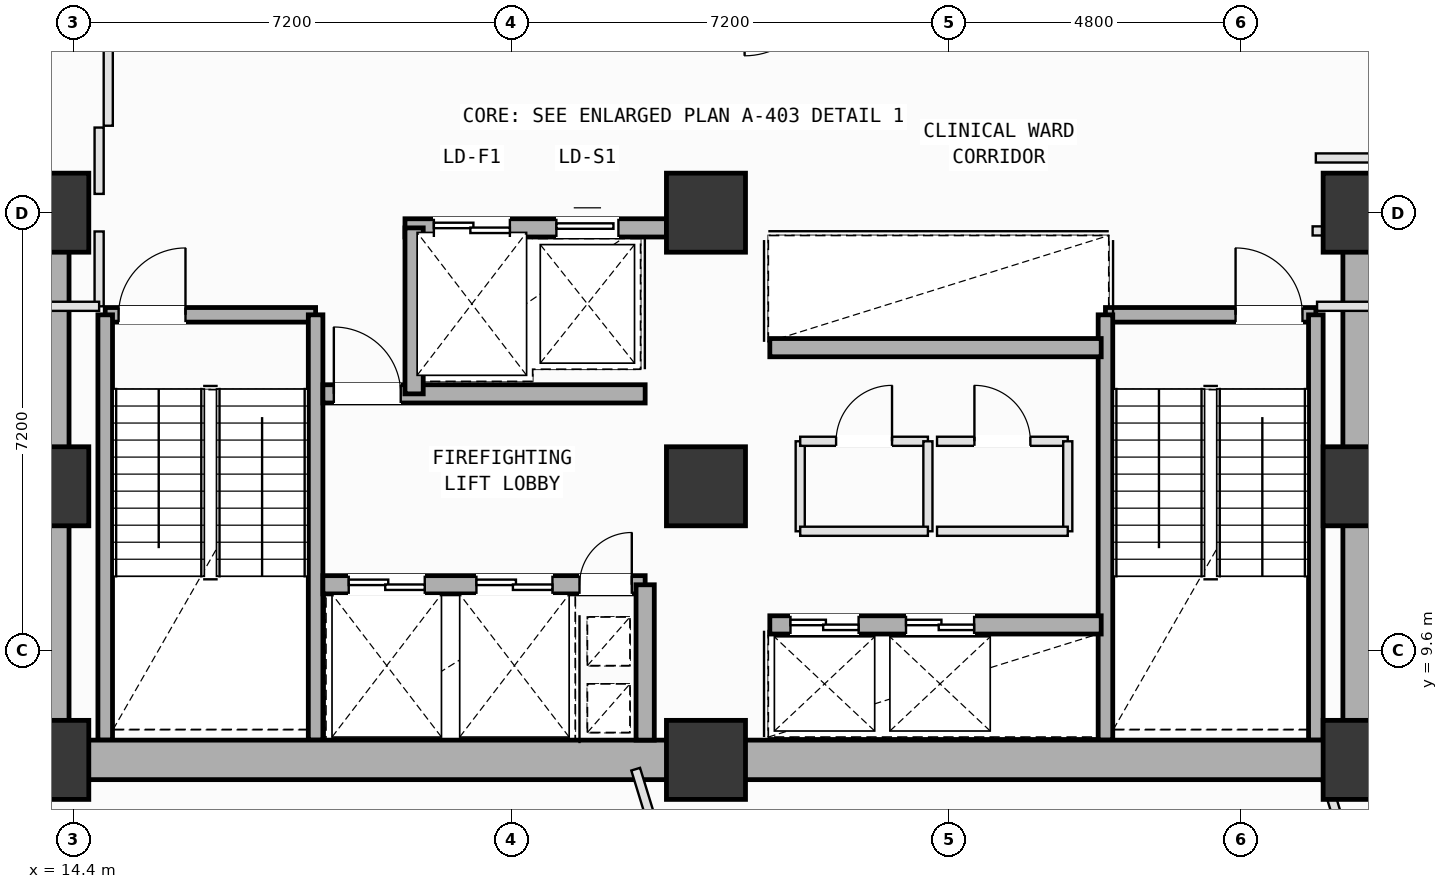
"""IFC4 building model, lengths in metres.
Left out: names, types, materials, properties, quantities, classifications, styles, units other than length and angle.
Written with IfcOpenShell. Run it as: python <this file> out.ifc"""

import sys

from ifc_helpers import new_model, si_unit, direction, frame, frame_2d, origin, origin_2d, place, context, subcontext, project, spatial, rectangle, extrude, element, fill, save


model = new_model("IFC4")
c1 = context("Model", 3, precision=1e-05, world=origin(), true_north=direction((0.0, 1.0)))
c2 = subcontext(c1, "Body", "Model", "MODEL_VIEW")
j1 = project(units=[si_unit("LENGTHUNIT", "METRE"), si_unit("PLANEANGLEUNIT", "RADIAN")], contexts=[c1])
p1 = place(None, origin())
s1 = spatial("IfcSite", under=j1, at=p1, CompositionType="ELEMENT")
p2 = place(p1, origin())
s2 = spatial("IfcBuilding", under=s1, at=p2, CompositionType="ELEMENT")
p3 = place(p2, frame((0.0, 0.0, 96.4)))
s3 = spatial("IfcBuildingStorey", under=s2, at=p3, CompositionType="ELEMENT", Elevation=96.4)
for number, where, z_axis, x_axis in (
    (1, (14.0, 7.8, 0.0), (0.0, 0.0, 1.0), (1.0, 0.0, 0.0)),
    (2, (14.0, 12.3, 0.0), (0.0, 0.0, 1.0), (1.0, 0.0, 0.0)),
    (3, (14.0, 16.8, 0.0), (0.0, 0.0, 1.0), (1.0, 0.0, 0.0)),
    (4, (24.8, 7.8, 0.0), (0.0, 0.0, 1.0), (1.0, 0.0, 0.0)),
    (5, (24.8, 12.3, 0.0), (0.0, 0.0, 1.0), (1.0, 0.0, 0.0)),
    (6, (24.8, 16.8, 0.0), (0.0, 0.0, 1.0), (1.0, 0.0, 0.0)),
    (7, (35.6, 7.8, 0.0), (0.0, 0.0, 1.0), (1.0, 0.0, 0.0)),
    (8, (35.6, 12.3, 0.0), (0.0, 0.0, 1.0), (1.0, 0.0, 0.0)),
    (9, (35.6, 16.8, 0.0), (0.0, 0.0, 1.0), (1.0, 0.0, 0.0)),
):
    element("IfcColumn", number, at=place(p3, frame(where, z_axis=z_axis, x_axis=x_axis)), inside=s3, PredefinedType="COLUMN", context=c2, shape_type="SweptSolid", body=[
        extrude(rectangle(XDim=1.3, YDim=1.3, at=origin_2d()), origin(), (0.0, 0.0, 1.0), 4.0),
    ])
p4 = place(p3, frame((14.92, 15.12, 0.0), z_axis=(0.0, 0.0, 1.0), x_axis=(1.0, 0.0, 0.0)))
e10 = element("IfcWall", 10, at=p4, inside=s3, PredefinedType="SOLIDWALL", context=c2, shape_type="SweptSolid", body=[
    extrude(rectangle(XDim=3.46, YDim=0.24, at=frame_2d((1.73, 0.0))), origin(), (0.0, 0.0, 1.0), 3.78),
])
p5 = place(p4, frame((0.22, 0.0, 0.0)))
e11 = element("IfcOpeningElement", 11, at=p5, cuts=e10, PredefinedType="OPENING", context=c2, shape_type="SweptSolid", body=[
    extrude(rectangle(XDim=1.1, YDim=2.15, at=frame_2d((0.55, 1.075))), frame((0.0, 0.13, 0.0), z_axis=(0.0, -1.0, 0.0), x_axis=(1.0, 0.0, 0.0)), (0.0, 0.0, 1.0), 0.26),
])
for number, where, z_axis, x_axis in (
    (12, (18.38, 15.12, 0.0), (0.0, 0.0, 1.0), (0.0, -1.0, 0.0)),
    (13, (14.92, 8.125, 0.0), (0.0, 0.0, 1.0), (0.0, 1.0, 0.0)),
):
    element("IfcWall", number, at=place(p3, frame(where, z_axis=z_axis, x_axis=x_axis)), inside=s3, PredefinedType="SOLIDWALL", context=c2, shape_type="SweptSolid", body=[
        extrude(rectangle(XDim=6.995, YDim=0.24, at=frame_2d((3.498, 0.0))), origin(), (0.0, 0.0, 1.0), 3.78),
    ])
p6 = place(p3, frame((31.37, 15.12, 0.0), z_axis=(0.0, 0.0, 1.0), x_axis=(1.0, 0.0, 0.0)))
e14 = element("IfcWall", 14, at=p6, inside=s3, PredefinedType="SOLIDWALL", context=c2, shape_type="SweptSolid", body=[
    extrude(rectangle(XDim=3.46, YDim=0.24, at=frame_2d((1.73, 0.0))), origin(), (0.0, 0.0, 1.0), 3.78),
])
p7 = place(p6, frame((2.14, 0.0, 0.0)))
e15 = element("IfcOpeningElement", 15, at=p7, cuts=e14, PredefinedType="OPENING", context=c2, shape_type="SweptSolid", body=[
    extrude(rectangle(XDim=1.1, YDim=2.15, at=frame_2d((0.55, 1.075))), frame((0.0, 0.13, 0.0), z_axis=(0.0, -1.0, 0.0), x_axis=(1.0, 0.0, 0.0)), (0.0, 0.0, 1.0), 0.26),
])
for number, where, z_axis, x_axis in (
    (16, (34.83, 15.12, 0.0), (0.0, 0.0, 1.0), (0.0, -1.0, 0.0)),
    (17, (31.37, 8.125, 0.0), (0.0, 0.0, 1.0), (0.0, 1.0, 0.0)),
):
    element("IfcWall", number, at=place(p3, frame(where, z_axis=z_axis, x_axis=x_axis)), inside=s3, PredefinedType="SOLIDWALL", context=c2, shape_type="SweptSolid", body=[
        extrude(rectangle(XDim=6.995, YDim=0.24, at=frame_2d((3.498, 0.0))), origin(), (0.0, 0.0, 1.0), 3.78),
    ])
for number, where, z_axis, x_axis in (
    (18, (14.0, 7.8, 0.0), (0.0, 0.0, 1.0), (1.0, 0.0, 0.0)),
    (19, (24.8, 7.8, 0.0), (0.0, 0.0, 1.0), (1.0, 0.0, 0.0)),
):
    element("IfcWall", number, at=place(p3, frame(where, z_axis=z_axis, x_axis=x_axis)), inside=s3, PredefinedType="SHEAR", context=c2, shape_type="SweptSolid", body=[
        extrude(rectangle(XDim=10.8, YDim=0.65, at=frame_2d((5.4, 0.0))), origin(), (0.0, 0.0, 1.0), 3.78),
    ])
for number, where, z_axis, x_axis in (
    (20, (35.6, 7.8, 0.0), (0.0, 0.0, 1.0), (0.0, 1.0, 0.0)),
    (21, (14.0, 16.8, 0.0), (0.0, 0.0, 1.0), (0.0, -1.0, 0.0)),
):
    element("IfcWall", number, at=place(p3, frame(where, z_axis=z_axis, x_axis=x_axis)), inside=s3, PredefinedType="SHEAR", context=c2, shape_type="SweptSolid", body=[
        extrude(rectangle(XDim=9.0, YDim=0.65, at=frame_2d((4.5, 0.0))), origin(), (0.0, 0.0, 1.0), 3.78),
    ])
p8 = place(p3, frame((19.85, 16.55, 0.0), z_axis=(0.0, 0.0, 1.0), x_axis=(1.0, 0.0, 0.0)))
e22 = element("IfcWall", 22, at=p8, inside=s3, PredefinedType="SOLIDWALL", context=c2, shape_type="SweptSolid", body=[
    extrude(rectangle(XDim=4.3, YDim=0.3, at=frame_2d((2.15, 0.0))), origin(), (0.0, 0.0, 1.0), 3.78),
])
p9 = place(p8, frame((0.475, 0.0, 0.0)))
e23 = element("IfcOpeningElement", 23, at=p9, cuts=e22, PredefinedType="OPENING", context=c2, shape_type="SweptSolid", body=[
    extrude(rectangle(XDim=1.25, YDim=2.18, at=frame_2d((0.625, 1.09))), frame((0.0, 0.16, 0.0), z_axis=(0.0, -1.0, 0.0), x_axis=(1.0, 0.0, 0.0)), (0.0, 0.0, 1.0), 0.32),
])
p10 = place(p8, frame((2.49, 0.0, 0.0)))
e24 = element("IfcOpeningElement", 24, at=p10, cuts=e22, PredefinedType="OPENING", context=c2, shape_type="SweptSolid", body=[
    extrude(rectangle(XDim=1.02, YDim=2.12, at=frame_2d((0.51, 1.06))), frame((0.0, 0.16, 0.0), z_axis=(0.0, -1.0, 0.0), x_axis=(1.0, 0.0, 0.0)), (0.0, 0.0, 1.0), 0.32),
])
p11 = place(p3, frame((18.5, 10.68, 0.0), z_axis=(0.0, 0.0, 1.0), x_axis=(1.0, 0.0, 0.0)))
e25 = element("IfcWall", 25, at=p11, inside=s3, PredefinedType="SOLIDWALL", context=c2, shape_type="SweptSolid", body=[
    extrude(rectangle(XDim=5.3, YDim=0.3, at=frame_2d((2.65, 0.0))), origin(), (0.0, 0.0, 1.0), 3.78),
])
p12 = place(p11, frame((4.22, 0.0, 0.0)))
e26 = element("IfcOpeningElement", 26, at=p12, cuts=e25, PredefinedType="OPENING", context=c2, shape_type="SweptSolid", body=[
    extrude(rectangle(XDim=0.86, YDim=2.06, at=frame_2d((0.43, 1.03))), frame((0.0, 0.16, 0.0), z_axis=(0.0, -1.0, 0.0), x_axis=(1.0, 0.0, 0.0)), (0.0, 0.0, 1.0), 0.32),
])
p13 = place(p11, frame((0.425, 0.0, 0.0)))
e27 = element("IfcOpeningElement", 27, at=p13, cuts=e25, PredefinedType="OPENING", context=c2, shape_type="SweptSolid", body=[
    extrude(rectangle(XDim=1.25, YDim=2.18, at=frame_2d((0.625, 1.09))), frame((0.0, 0.16, 0.0), z_axis=(0.0, -1.0, 0.0), x_axis=(1.0, 0.0, 0.0)), (0.0, 0.0, 1.0), 0.32),
])
p14 = place(p11, frame((2.525, 0.0, 0.0)))
e28 = element("IfcOpeningElement", 28, at=p14, cuts=e25, PredefinedType="OPENING", context=c2, shape_type="SweptSolid", body=[
    extrude(rectangle(XDim=1.25, YDim=2.18, at=frame_2d((0.625, 1.09))), frame((0.0, 0.16, 0.0), z_axis=(0.0, -1.0, 0.0), x_axis=(1.0, 0.0, 0.0)), (0.0, 0.0, 1.0), 0.32),
])
p15 = place(p3, frame((18.5, 13.82, 0.0), z_axis=(0.0, 0.0, 1.0), x_axis=(1.0, 0.0, 0.0)))
e29 = element("IfcWall", 29, at=p15, inside=s3, PredefinedType="SOLIDWALL", context=c2, shape_type="SweptSolid", body=[
    extrude(rectangle(XDim=5.3, YDim=0.3, at=frame_2d((2.65, 0.0))), origin(), (0.0, 0.0, 1.0), 3.78),
])
p16 = place(p15, frame((0.18, 0.0, 0.0)))
e30 = element("IfcOpeningElement", 30, at=p16, cuts=e29, PredefinedType="OPENING", context=c2, shape_type="SweptSolid", body=[
    extrude(rectangle(XDim=1.1, YDim=2.15, at=frame_2d((0.55, 1.075))), frame((0.0, 0.16, 0.0), z_axis=(0.0, -1.0, 0.0), x_axis=(1.0, 0.0, 0.0)), (0.0, 0.0, 1.0), 0.32),
])
p17 = place(p3, frame((23.8, 8.125, 0.0), z_axis=(0.0, 0.0, 1.0), x_axis=(0.0, 1.0, 0.0)))
e31 = element("IfcWall", 31, at=p17, inside=s3, PredefinedType="SOLIDWALL", context=c2, shape_type="SweptSolid", body=[
    extrude(rectangle(XDim=2.555, YDim=0.3, at=frame_2d((1.277, 0.0))), origin(), (0.0, 0.0, 1.0), 3.78),
])
p18 = place(p3, frame((20.0, 13.82, 0.0), z_axis=(0.0, 0.0, 1.0), x_axis=(0.0, 1.0, 0.0)))
e32 = element("IfcWall", 32, at=p18, inside=s3, PredefinedType="SOLIDWALL", context=c2, shape_type="SweptSolid", body=[
    extrude(rectangle(XDim=2.73, YDim=0.3, at=frame_2d((1.365, 0.0))), origin(), (0.0, 0.0, 1.0), 3.78),
])
p19 = place(p3, frame((25.85, 10.02, 0.0), z_axis=(0.0, 0.0, 1.0), x_axis=(1.0, 0.0, 0.0)))
e33 = element("IfcWall", 33, at=p19, inside=s3, PredefinedType="SOLIDWALL", context=c2, shape_type="SweptSolid", body=[
    extrude(rectangle(XDim=5.45, YDim=0.3, at=frame_2d((2.725, 0.0))), origin(), (0.0, 0.0, 1.0), 3.78),
])
p20 = place(p19, frame((0.34, 0.0, 0.0)))
e34 = element("IfcOpeningElement", 34, at=p20, cuts=e33, PredefinedType="OPENING", context=c2, shape_type="SweptSolid", body=[
    extrude(rectangle(XDim=1.12, YDim=2.15, at=frame_2d((0.56, 1.075))), frame((0.0, 0.16, 0.0), z_axis=(0.0, -1.0, 0.0), x_axis=(1.0, 0.0, 0.0)), (0.0, 0.0, 1.0), 0.32),
])
p21 = place(p19, frame((2.24, 0.0, 0.0)))
e35 = element("IfcOpeningElement", 35, at=p21, cuts=e33, PredefinedType="OPENING", context=c2, shape_type="SweptSolid", body=[
    extrude(rectangle(XDim=1.12, YDim=2.15, at=frame_2d((0.56, 1.075))), frame((0.0, 0.16, 0.0), z_axis=(0.0, -1.0, 0.0), x_axis=(1.0, 0.0, 0.0)), (0.0, 0.0, 1.0), 0.32),
])
p22 = place(p3, frame((25.85, 14.58, 0.0), z_axis=(0.0, 0.0, 1.0), x_axis=(1.0, 0.0, 0.0)))
e36 = element("IfcWall", 36, at=p22, inside=s3, PredefinedType="SOLIDWALL", context=c2, shape_type="SweptSolid", body=[
    extrude(rectangle(XDim=5.45, YDim=0.3, at=frame_2d((2.725, 0.0))), origin(), (0.0, 0.0, 1.0), 3.78),
])
p23 = place(p3, frame((26.35, 11.56, 0.0), z_axis=(0.0, 0.0, 1.0), x_axis=(0.0, 1.0, 0.0)))
e37 = element("IfcWall", 37, at=p23, inside=s3, PredefinedType="PARTITIONING", context=c2, shape_type="SweptSolid", body=[
    extrude(rectangle(XDim=1.48, YDim=0.15, at=frame_2d((0.74, 0.0))), origin(), (0.0, 0.0, 1.0), 3.78),
])
p24 = place(p3, frame((26.35, 13.04, 0.0), z_axis=(0.0, 0.0, 1.0), x_axis=(1.0, 0.0, 0.0)))
e38 = element("IfcWall", 38, at=p24, inside=s3, PredefinedType="PARTITIONING", context=c2, shape_type="SweptSolid", body=[
    extrude(rectangle(XDim=2.1, YDim=0.15, at=frame_2d((1.05, 0.0))), origin(), (0.0, 0.0, 1.0), 3.78),
])
p25 = place(p24, frame((0.59, 0.0, 0.0)))
e39 = element("IfcOpeningElement", 39, at=p25, cuts=e38, PredefinedType="OPENING", context=c2, shape_type="SweptSolid", body=[
    extrude(rectangle(XDim=0.92, YDim=2.1, at=frame_2d((0.46, 1.05))), frame((0.0, 0.085, 0.0), z_axis=(0.0, -1.0, 0.0), x_axis=(1.0, 0.0, 0.0)), (0.0, 0.0, 1.0), 0.17),
])
p26 = place(p3, frame((28.45, 13.04, 0.0), z_axis=(0.0, 0.0, 1.0), x_axis=(0.0, -1.0, 0.0)))
e40 = element("IfcWall", 40, at=p26, inside=s3, PredefinedType="PARTITIONING", context=c2, shape_type="SweptSolid", body=[
    extrude(rectangle(XDim=1.48, YDim=0.15, at=frame_2d((0.74, 0.0))), origin(), (0.0, 0.0, 1.0), 3.78),
])
p27 = place(p3, frame((28.45, 11.56, 0.0), z_axis=(0.0, 0.0, 1.0), x_axis=(-1.0, 0.0, 0.0)))
e41 = element("IfcWall", 41, at=p27, inside=s3, PredefinedType="PARTITIONING", context=c2, shape_type="SweptSolid", body=[
    extrude(rectangle(XDim=2.1, YDim=0.15, at=frame_2d((1.05, 0.0))), origin(), (0.0, 0.0, 1.0), 3.78),
])
p28 = place(p3, frame((28.6, 13.04, 0.0), z_axis=(0.0, 0.0, 1.0), x_axis=(1.0, 0.0, 0.0)))
e42 = element("IfcWall", 42, at=p28, inside=s3, PredefinedType="PARTITIONING", context=c2, shape_type="SweptSolid", body=[
    extrude(rectangle(XDim=2.15, YDim=0.15, at=frame_2d((1.075, 0.0))), origin(), (0.0, 0.0, 1.0), 3.78),
])
p29 = place(p28, frame((0.615, 0.0, 0.0)))
e43 = element("IfcOpeningElement", 43, at=p29, cuts=e42, PredefinedType="OPENING", context=c2, shape_type="SweptSolid", body=[
    extrude(rectangle(XDim=0.92, YDim=2.1, at=frame_2d((0.46, 1.05))), frame((0.0, 0.085, 0.0), z_axis=(0.0, -1.0, 0.0), x_axis=(1.0, 0.0, 0.0)), (0.0, 0.0, 1.0), 0.17),
])
p30 = place(p3, frame((30.75, 13.04, 0.0), z_axis=(0.0, 0.0, 1.0), x_axis=(0.0, -1.0, 0.0)))
e44 = element("IfcWall", 44, at=p30, inside=s3, PredefinedType="PARTITIONING", context=c2, shape_type="SweptSolid", body=[
    extrude(rectangle(XDim=1.48, YDim=0.15, at=frame_2d((0.74, 0.0))), origin(), (0.0, 0.0, 1.0), 3.78),
])
p31 = place(p3, frame((30.75, 11.56, 0.0), z_axis=(0.0, 0.0, 1.0), x_axis=(-1.0, 0.0, 0.0)))
e45 = element("IfcWall", 45, at=p31, inside=s3, PredefinedType="PARTITIONING", context=c2, shape_type="SweptSolid", body=[
    extrude(rectangle(XDim=2.15, YDim=0.15, at=frame_2d((1.075, 0.0))), origin(), (0.0, 0.0, 1.0), 3.78),
])
p32 = place(p3, frame((23.644, 7.647, 0.0), z_axis=(0.0, 0.0, 1.0), x_axis=(0.294077912985, -0.955781450487, 0.0)))
e46 = element("IfcWall", 46, at=p32, inside=s3, PredefinedType="PARTITIONING", context=c2, shape_type="SweptSolid", body=[
    extrude(rectangle(XDim=8.647, YDim=0.15, at=frame_2d((4.324, 0.0))), origin(), (0.0, 0.0, 1.0), 3.78),
])
p33 = place(p32, frame((4.051, 0.0, 0.0)))
e47 = element("IfcOpeningElement", 47, at=p33, cuts=e46, PredefinedType="OPENING", context=c2, shape_type="SweptSolid", body=[
    extrude(rectangle(XDim=0.86, YDim=2.06, at=frame_2d((0.43, 1.03))), frame((0.0, 0.085, 0.0), z_axis=(0.0, -1.0, 0.0), x_axis=(1.0, 0.0, 0.0)), (0.0, 0.0, 1.0), 0.17),
])
p34 = place(p3, frame((34.988, 7.5, 0.0), z_axis=(0.0, 0.0, 1.0), x_axis=(0.294092483167, -0.955776967365, 0.0)))
e48 = element("IfcWall", 48, at=p34, inside=s3, PredefinedType="PARTITIONING", context=c2, shape_type="SweptSolid", body=[
    extrude(rectangle(XDim=5.172, YDim=0.15, at=frame_2d((2.586, 0.0))), origin(), (0.0, 0.0, 1.0), 3.78),
])
p35 = place(p34, frame((3.169, 0.0, 0.0)))
e49 = element("IfcOpeningElement", 49, at=p35, cuts=e48, PredefinedType="OPENING", context=c2, shape_type="SweptSolid", body=[
    extrude(rectangle(XDim=0.86, YDim=2.06, at=frame_2d((0.43, 1.03))), frame((0.0, 0.085, 0.0), z_axis=(0.0, -1.0, 0.0), x_axis=(1.0, 0.0, 0.0)), (0.0, 0.0, 1.0), 0.17),
])
p36 = place(p3, frame((36.15, 15.26, 0.0), z_axis=(0.0, 0.0, 1.0), x_axis=(-1.0, 0.0, 0.0)))
e50 = element("IfcWall", 50, at=p36, inside=s3, PredefinedType="PARTITIONING", context=c2, shape_type="SweptSolid", body=[
    extrude(rectangle(XDim=1.3, YDim=0.15, at=frame_2d((0.65, 0.0))), origin(), (0.0, 0.0, 1.0), 3.78),
])
p37 = place(p3, frame((34.777, 16.5, 0.0), z_axis=(0.0, 0.0, 1.0), x_axis=(1.0, 0.0, 0.0)))
e51 = element("IfcWall", 51, at=p37, inside=s3, PredefinedType="PARTITIONING", context=c2, shape_type="SweptSolid", body=[
    extrude(rectangle(XDim=1.723, YDim=0.15, at=frame_2d((0.861, 0.0))), origin(), (0.0, 0.0, 1.0), 2.965),
])
p38 = place(p3, frame((36.5, 17.7, 0.0), z_axis=(0.0, 0.0, 1.0), x_axis=(-1.0, 0.0, 0.0)))
e52 = element("IfcWall", 52, at=p38, inside=s3, PredefinedType="PARTITIONING", context=c2, shape_type="SweptSolid", body=[
    extrude(rectangle(XDim=1.67, YDim=0.15, at=frame_2d((0.835, 0.0))), origin(), (0.0, 0.0, 1.0), 3.78),
])
p39 = place(p3, frame((14.97, 20.55, 0.0), z_axis=(0.0, 0.0, 1.0), x_axis=(0.0, -1.0, 0.0)))
e53 = element("IfcWall", 53, at=p39, inside=s3, PredefinedType="PARTITIONING", context=c2, shape_type="SweptSolid", body=[
    extrude(rectangle(XDim=2.32, YDim=0.15, at=frame_2d((1.16, 0.0))), origin(), (0.0, 0.0, 1.0), 2.965),
])
p40 = place(p3, frame((14.82, 18.2, 0.0), z_axis=(0.0, 0.0, 1.0), x_axis=(0.0, -1.0, 0.0)))
e54 = element("IfcWall", 54, at=p40, inside=s3, PredefinedType="PARTITIONING", context=c2, shape_type="SweptSolid", body=[
    extrude(rectangle(XDim=1.091, YDim=0.15, at=frame_2d((0.545, 0.0))), origin(), (0.0, 0.0, 1.0), 3.78),
])
p41 = place(p3, frame((14.82, 16.491, 0.0), z_axis=(0.0, 0.0, 1.0), x_axis=(0.0, -1.0, 0.0)))
e55 = element("IfcWall", 55, at=p41, inside=s3, PredefinedType="PARTITIONING", context=c2, shape_type="SweptSolid", body=[
    extrude(rectangle(XDim=1.231, YDim=0.15, at=frame_2d((0.615, 0.0))), origin(), (0.0, 0.0, 1.0), 3.78),
])
p42 = place(p3, frame((14.82, 15.26, 0.0), z_axis=(0.0, 0.0, 1.0), x_axis=(-1.0, 0.0, 0.0)))
e56 = element("IfcWall", 56, at=p42, inside=s3, PredefinedType="PARTITIONING", context=c2, shape_type="SweptSolid", body=[
    extrude(rectangle(XDim=1.12, YDim=0.15, at=frame_2d((0.56, 0.0))), origin(), (0.0, 0.0, 1.0), 3.78),
])
p43 = place(p5, origin())
e57 = element("IfcDoor", 57, at=p43, inside=s3, OperationType="SINGLE_SWING_RIGHT", PredefinedType="DOOR", context=c2, shape_type="SweptSolid", body=[
    extrude(rectangle(XDim=1.1, YDim=2.15, at=frame_2d((0.55, 1.075))), frame((0.0, 0.025, 0.0), z_axis=(0.0, -1.0, 0.0), x_axis=(1.0, 0.0, 0.0)), (0.0, 0.0, 1.0), 0.05),
])
fill(e11, e57)
p44 = place(p7, origin())
e58 = element("IfcDoor", 58, at=p44, inside=s3, OperationType="SINGLE_SWING_LEFT", PredefinedType="DOOR", context=c2, shape_type="SweptSolid", body=[
    extrude(rectangle(XDim=1.1, YDim=2.15, at=frame_2d((0.55, 1.075))), frame((0.0, 0.025, 0.0), z_axis=(0.0, -1.0, 0.0), x_axis=(1.0, 0.0, 0.0)), (0.0, 0.0, 1.0), 0.05),
])
fill(e15, e58)
p45 = place(p12, origin())
e59 = element("IfcDoor", 59, at=p45, inside=s3, OperationType="SINGLE_SWING_RIGHT", PredefinedType="DOOR", context=c2, shape_type="SweptSolid", body=[
    extrude(rectangle(XDim=0.86, YDim=2.06, at=frame_2d((0.43, 1.03))), frame((0.0, 0.025, 0.0), z_axis=(0.0, -1.0, 0.0), x_axis=(1.0, 0.0, 0.0)), (0.0, 0.0, 1.0), 0.05),
])
fill(e26, e59)
p46 = place(p16, origin())
e60 = element("IfcDoor", 60, at=p46, inside=s3, OperationType="SINGLE_SWING_LEFT", PredefinedType="DOOR", context=c2, shape_type="SweptSolid", body=[
    extrude(rectangle(XDim=1.1, YDim=2.15, at=frame_2d((0.55, 1.075))), frame((0.0, 0.025, 0.0), z_axis=(0.0, -1.0, 0.0), x_axis=(1.0, 0.0, 0.0)), (0.0, 0.0, 1.0), 0.05),
])
fill(e30, e60)
p47 = place(p13, origin())
e61 = element("IfcDoor", 61, at=p47, inside=s3, OperationType="DOUBLE_DOOR_SLIDING", PredefinedType="DOOR", context=c2, shape_type="SweptSolid", body=[
    extrude(rectangle(XDim=1.25, YDim=2.18, at=frame_2d((0.625, 1.09))), frame((0.0, 0.025, 0.0), z_axis=(0.0, -1.0, 0.0), x_axis=(1.0, 0.0, 0.0)), (0.0, 0.0, 1.0), 0.05),
])
fill(e27, e61)
p48 = place(p14, origin())
e62 = element("IfcDoor", 62, at=p48, inside=s3, OperationType="DOUBLE_DOOR_SLIDING", PredefinedType="DOOR", context=c2, shape_type="SweptSolid", body=[
    extrude(rectangle(XDim=1.25, YDim=2.18, at=frame_2d((0.625, 1.09))), frame((0.0, 0.025, 0.0), z_axis=(0.0, -1.0, 0.0), x_axis=(1.0, 0.0, 0.0)), (0.0, 0.0, 1.0), 0.05),
])
fill(e28, e62)
p49 = place(p20, origin())
e63 = element("IfcDoor", 63, at=p49, inside=s3, OperationType="DOUBLE_DOOR_SLIDING", PredefinedType="DOOR", context=c2, shape_type="SweptSolid", body=[
    extrude(rectangle(XDim=1.12, YDim=2.15, at=frame_2d((0.56, 1.075))), frame((0.0, 0.025, 0.0), z_axis=(0.0, -1.0, 0.0), x_axis=(1.0, 0.0, 0.0)), (0.0, 0.0, 1.0), 0.05),
])
fill(e34, e63)
p50 = place(p21, origin())
e64 = element("IfcDoor", 64, at=p50, inside=s3, OperationType="DOUBLE_DOOR_SLIDING", PredefinedType="DOOR", context=c2, shape_type="SweptSolid", body=[
    extrude(rectangle(XDim=1.12, YDim=2.15, at=frame_2d((0.56, 1.075))), frame((0.0, 0.025, 0.0), z_axis=(0.0, -1.0, 0.0), x_axis=(1.0, 0.0, 0.0)), (0.0, 0.0, 1.0), 0.05),
])
fill(e35, e64)
p51 = place(p9, origin())
e65 = element("IfcDoor", 65, at=p51, inside=s3, OperationType="DOUBLE_DOOR_SLIDING", PredefinedType="DOOR", context=c2, shape_type="SweptSolid", body=[
    extrude(rectangle(XDim=1.25, YDim=2.18, at=frame_2d((0.625, 1.09))), frame((0.0, 0.025, 0.0), z_axis=(0.0, -1.0, 0.0), x_axis=(1.0, 0.0, 0.0)), (0.0, 0.0, 1.0), 0.05),
])
fill(e23, e65)
p52 = place(p10, origin())
e66 = element("IfcDoor", 66, at=p52, inside=s3, OperationType="SLIDING_TO_LEFT", PredefinedType="DOOR", context=c2, shape_type="SweptSolid", body=[
    extrude(rectangle(XDim=1.02, YDim=2.12, at=frame_2d((0.51, 1.06))), frame((0.0, 0.025, 0.0), z_axis=(0.0, -1.0, 0.0), x_axis=(1.0, 0.0, 0.0)), (0.0, 0.0, 1.0), 0.05),
])
fill(e24, e66)
p53 = place(p25, origin())
e67 = element("IfcDoor", 67, at=p53, inside=s3, OperationType="SINGLE_SWING_RIGHT", PredefinedType="DOOR", context=c2, shape_type="SweptSolid", body=[
    extrude(rectangle(XDim=0.92, YDim=2.1, at=frame_2d((0.46, 1.05))), frame((0.0, 0.025, 0.0), z_axis=(0.0, -1.0, 0.0), x_axis=(1.0, 0.0, 0.0)), (0.0, 0.0, 1.0), 0.05),
])
fill(e39, e67)
p54 = place(p29, origin())
e68 = element("IfcDoor", 68, at=p54, inside=s3, OperationType="SINGLE_SWING_LEFT", PredefinedType="DOOR", context=c2, shape_type="SweptSolid", body=[
    extrude(rectangle(XDim=0.92, YDim=2.1, at=frame_2d((0.46, 1.05))), frame((0.0, 0.025, 0.0), z_axis=(0.0, -1.0, 0.0), x_axis=(1.0, 0.0, 0.0)), (0.0, 0.0, 1.0), 0.05),
])
fill(e43, e68)
save(model, sys.argv[1])
